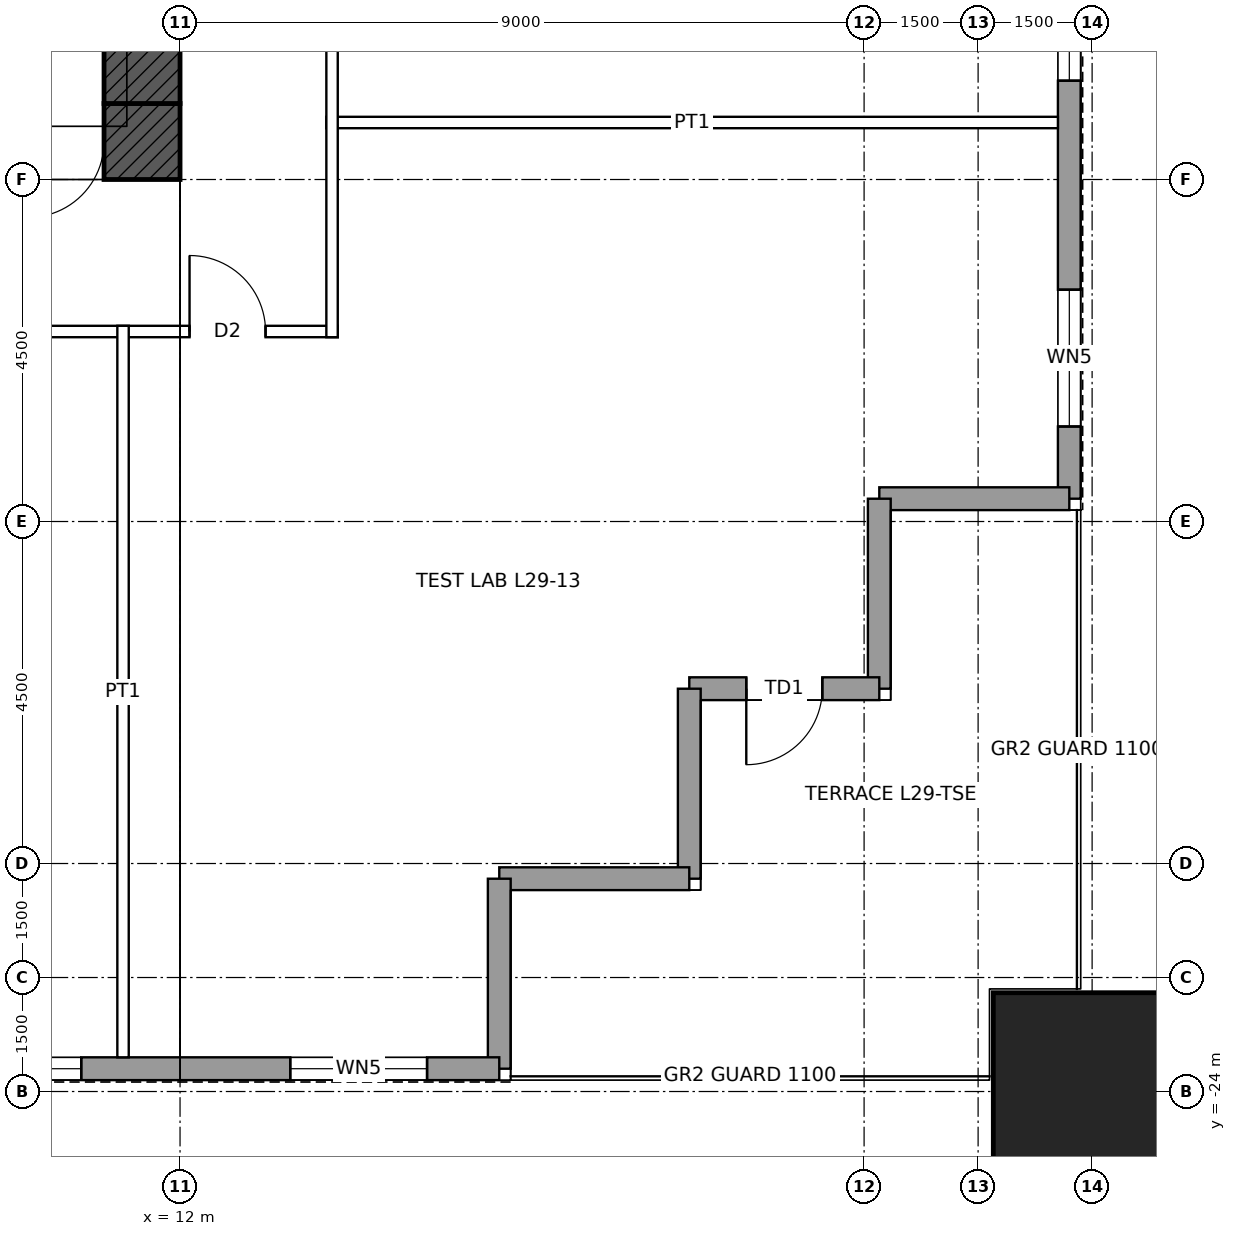
"""IFC4 building model, lengths in metres.
Left out: names, types, materials, properties, quantities, classifications, styles, units other than length and angle.
Written with IfcOpenShell. Run it as: python <this file> out.ifc"""

import sys

from ifc_helpers import new_model, si_unit, direction, frame, frame_2d, origin, origin_2d, place, context, subcontext, project, spatial, rectangle, hollow_rectangle, extrude, element, fill, save


model = new_model("IFC4")
c1 = context("Model", 3, precision=1e-05, world=origin(), true_north=direction((0.0, 1.0)))
c2 = subcontext(c1, "Body", "Model", "MODEL_VIEW")
j1 = project(units=[si_unit("LENGTHUNIT", "METRE"), si_unit("PLANEANGLEUNIT", "RADIAN")], contexts=[c1])
p1 = place(None, origin())
s1 = spatial("IfcSite", under=j1, at=p1, CompositionType="ELEMENT")
p2 = place(p1, origin())
s2 = spatial("IfcBuilding", under=s1, at=p2, CompositionType="ELEMENT")
p3 = place(p2, frame((0.0, 0.0, 144.9)))
s3 = spatial("IfcBuildingStorey", under=s2, at=p3, CompositionType="ELEMENT", Elevation=144.9)
p4 = place(p3, frame((24.0, -24.0, 0.0), z_axis=(0.0, 0.0, 1.0), x_axis=(1.0, 0.0, 0.0)))
e1 = element("IfcColumn", 1, at=p4, inside=s3, PredefinedType="COLUMN", context=c2, shape_type="SweptSolid", body=[
    extrude(hollow_rectangle(XDim=2.6, YDim=2.6, WallThickness=0.13, at=origin_2d()), origin(), (0.0, 0.0, 1.0), 4.5),
])
p5 = place(p3, frame((12.0, -11.5, 0.0), z_axis=(0.0, 0.0, 1.0), x_axis=(-1.0, 0.0, 0.0)))
e2 = element("IfcWall", 2, at=p5, inside=s3, PredefinedType="SHEAR", context=c2, shape_type="SweptSolid", body=[
    extrude(rectangle(XDim=24.0, YDim=1.0, at=frame_2d((12.0, 0.0))), origin(), (0.0, 0.0, 1.0), 4.5),
])
p6 = place(p5, frame((11.5, 0.0, 0.0)))
e3 = element("IfcOpeningElement", 3, at=p6, cuts=e2, PredefinedType="OPENING", context=c2, shape_type="SweptSolid", body=[
    extrude(rectangle(XDim=1.0, YDim=2.1, at=frame_2d((0.5, 1.05))), frame((0.0, 0.51, 0.0), z_axis=(0.0, -1.0, 0.0), x_axis=(1.0, 0.0, 0.0)), (0.0, 0.0, 1.0), 1.02),
])
p7 = place(p5, frame((1.0, 0.0, 0.0)))
e4 = element("IfcOpeningElement", 4, at=p7, cuts=e2, PredefinedType="OPENING", context=c2, shape_type="SweptSolid", body=[
    extrude(rectangle(XDim=1.0, YDim=2.4, at=frame_2d((0.5, 1.2))), frame((0.0, 0.51, 0.0), z_axis=(0.0, -1.0, 0.0), x_axis=(1.0, 0.0, 0.0)), (0.0, 0.0, 1.0), 1.02),
])
p8 = place(p3, frame((11.5, 11.0, 0.0), z_axis=(0.0, 0.0, 1.0), x_axis=(0.0, -1.0, 0.0)))
e5 = element("IfcWall", 5, at=p8, inside=s3, PredefinedType="SHEAR", context=c2, shape_type="SweptSolid", body=[
    extrude(rectangle(XDim=22.0, YDim=1.0, at=frame_2d((11.0, 0.0))), origin(), (0.0, 0.0, 1.0), 4.5),
])
p9 = place(p8, frame((10.5, 0.0, 0.0)))
e6 = element("IfcOpeningElement", 6, at=p9, cuts=e5, PredefinedType="OPENING", context=c2, shape_type="SweptSolid", body=[
    extrude(rectangle(XDim=1.0, YDim=2.4, at=frame_2d((0.5, 1.2))), frame((0.0, 0.51, 0.0), z_axis=(0.0, -1.0, 0.0), x_axis=(1.0, 0.0, 0.0)), (0.0, 0.0, 1.0), 1.02),
])
p10 = place(p3, frame((23.7, 16.2, 0.0), z_axis=(0.0, 0.0, 1.0), x_axis=(0.0, -1.0, 0.0)))
e7 = element("IfcWall", 7, at=p10, inside=s3, PredefinedType="SOLIDWALL", context=c2, shape_type="SweptSolid", body=[
    extrude(rectangle(XDim=32.4, YDim=0.3, at=frame_2d((16.2, 0.0))), origin(), (0.0, 0.0, 1.0), 4.3),
])
p11 = place(p10, frame((0.95, 0.0, 1.0)))
e8 = element("IfcOpeningElement", 8, at=p11, cuts=e7, PredefinedType="OPENING", context=c2, shape_type="SweptSolid", body=[
    extrude(rectangle(XDim=1.8, YDim=1.2, at=frame_2d((0.9, 0.6))), frame((0.0, 0.16, 0.0), z_axis=(0.0, -1.0, 0.0), x_axis=(1.0, 0.0, 0.0)), (0.0, 0.0, 1.0), 0.32),
])
p12 = place(p10, frame((5.5, 0.0, 1.0)))
e9 = element("IfcOpeningElement", 9, at=p12, cuts=e7, PredefinedType="OPENING", context=c2, shape_type="SweptSolid", body=[
    extrude(rectangle(XDim=2.4, YDim=1.2, at=frame_2d((1.2, 0.6))), frame((0.0, 0.16, 0.0), z_axis=(0.0, -1.0, 0.0), x_axis=(1.0, 0.0, 0.0)), (0.0, 0.0, 1.0), 0.32),
])
p13 = place(p10, frame((9.5, 0.0, 1.0)))
e10 = element("IfcOpeningElement", 10, at=p13, cuts=e7, PredefinedType="OPENING", context=c2, shape_type="SweptSolid", body=[
    extrude(rectangle(XDim=2.4, YDim=1.2, at=frame_2d((1.2, 0.6))), frame((0.0, 0.16, 0.0), z_axis=(0.0, -1.0, 0.0), x_axis=(1.0, 0.0, 0.0)), (0.0, 0.0, 1.0), 0.32),
])
p14 = place(p10, frame((13.0, 0.0, 1.0)))
e11 = element("IfcOpeningElement", 11, at=p14, cuts=e7, PredefinedType="OPENING", context=c2, shape_type="SweptSolid", body=[
    extrude(rectangle(XDim=2.4, YDim=1.2, at=frame_2d((1.2, 0.6))), frame((0.0, 0.16, 0.0), z_axis=(0.0, -1.0, 0.0), x_axis=(1.0, 0.0, 0.0)), (0.0, 0.0, 1.0), 0.32),
])
p15 = place(p10, frame((17.0, 0.0, 1.0)))
e12 = element("IfcOpeningElement", 12, at=p15, cuts=e7, PredefinedType="OPENING", context=c2, shape_type="SweptSolid", body=[
    extrude(rectangle(XDim=2.4, YDim=1.2, at=frame_2d((1.2, 0.6))), frame((0.0, 0.16, 0.0), z_axis=(0.0, -1.0, 0.0), x_axis=(1.0, 0.0, 0.0)), (0.0, 0.0, 1.0), 0.32),
])
p16 = place(p10, frame((20.5, 0.0, 1.0)))
e13 = element("IfcOpeningElement", 13, at=p16, cuts=e7, PredefinedType="OPENING", context=c2, shape_type="SweptSolid", body=[
    extrude(rectangle(XDim=2.4, YDim=1.2, at=frame_2d((1.2, 0.6))), frame((0.0, 0.16, 0.0), z_axis=(0.0, -1.0, 0.0), x_axis=(1.0, 0.0, 0.0)), (0.0, 0.0, 1.0), 0.32),
])
p17 = place(p10, frame((24.5, 0.0, 1.0)))
e14 = element("IfcOpeningElement", 14, at=p17, cuts=e7, PredefinedType="OPENING", context=c2, shape_type="SweptSolid", body=[
    extrude(rectangle(XDim=2.4, YDim=1.2, at=frame_2d((1.2, 0.6))), frame((0.0, 0.16, 0.0), z_axis=(0.0, -1.0, 0.0), x_axis=(1.0, 0.0, 0.0)), (0.0, 0.0, 1.0), 0.32),
])
p18 = place(p10, frame((29.65, 0.0, 1.0)))
e15 = element("IfcOpeningElement", 15, at=p18, cuts=e7, PredefinedType="OPENING", context=c2, shape_type="SweptSolid", body=[
    extrude(rectangle(XDim=1.8, YDim=1.2, at=frame_2d((0.9, 0.6))), frame((0.0, 0.16, 0.0), z_axis=(0.0, -1.0, 0.0), x_axis=(1.0, 0.0, 0.0)), (0.0, 0.0, 1.0), 0.32),
])
for number, where, z_axis, x_axis in (
    (16, (23.7, -16.2, 0.0), (0.0, 0.0, 1.0), (-1.0, 0.0, 0.0)),
    (17, (21.2, -16.2, 0.0), (0.0, 0.0, 1.0), (0.0, -1.0, 0.0)),
):
    element("IfcWall", number, at=place(p3, frame(where, z_axis=z_axis, x_axis=x_axis)), inside=s3, PredefinedType="SOLIDWALL", context=c2, shape_type="SweptSolid", body=[
        extrude(rectangle(XDim=2.5, YDim=0.3, at=frame_2d((1.25, 0.0))), origin(), (0.0, 0.0, 1.0), 4.3),
    ])
p19 = place(p3, frame((21.2, -18.7, 0.0), z_axis=(0.0, 0.0, 1.0), x_axis=(-1.0, 0.0, 0.0)))
e18 = element("IfcWall", 18, at=p19, inside=s3, PredefinedType="SOLIDWALL", context=c2, shape_type="SweptSolid", body=[
    extrude(rectangle(XDim=2.5, YDim=0.3, at=frame_2d((1.25, 0.0))), origin(), (0.0, 0.0, 1.0), 4.3),
])
p20 = place(p19, frame((0.75, 0.0, 0.0)))
e19 = element("IfcOpeningElement", 19, at=p20, cuts=e18, PredefinedType="OPENING", context=c2, shape_type="SweptSolid", body=[
    extrude(rectangle(XDim=1.0, YDim=2.4, at=frame_2d((0.5, 1.2))), frame((0.0, 0.16, 0.0), z_axis=(0.0, -1.0, 0.0), x_axis=(1.0, 0.0, 0.0)), (0.0, 0.0, 1.0), 0.32),
])
for number, where, z_axis, x_axis in (
    (20, (18.7, -18.7, 0.0), (0.0, 0.0, 1.0), (0.0, -1.0, 0.0)),
    (21, (18.7, -21.2, 0.0), (0.0, 0.0, 1.0), (-1.0, 0.0, 0.0)),
    (22, (16.2, -21.2, 0.0), (0.0, 0.0, 1.0), (0.0, -1.0, 0.0)),
):
    element("IfcWall", number, at=place(p3, frame(where, z_axis=z_axis, x_axis=x_axis)), inside=s3, PredefinedType="SOLIDWALL", context=c2, shape_type="SweptSolid", body=[
        extrude(rectangle(XDim=2.5, YDim=0.3, at=frame_2d((1.25, 0.0))), origin(), (0.0, 0.0, 1.0), 4.3),
    ])
p21 = place(p3, frame((16.2, -23.7, 0.0), z_axis=(0.0, 0.0, 1.0), x_axis=(-1.0, 0.0, 0.0)))
e23 = element("IfcWall", 23, at=p21, inside=s3, PredefinedType="SOLIDWALL", context=c2, shape_type="SweptSolid", body=[
    extrude(rectangle(XDim=32.4, YDim=0.3, at=frame_2d((16.2, 0.0))), origin(), (0.0, 0.0, 1.0), 4.3),
])
p22 = place(p21, frame((0.95, 0.0, 1.0)))
e24 = element("IfcOpeningElement", 24, at=p22, cuts=e23, PredefinedType="OPENING", context=c2, shape_type="SweptSolid", body=[
    extrude(rectangle(XDim=1.8, YDim=1.2, at=frame_2d((0.9, 0.6))), frame((0.0, 0.16, 0.0), z_axis=(0.0, -1.0, 0.0), x_axis=(1.0, 0.0, 0.0)), (0.0, 0.0, 1.0), 0.32),
])
p23 = place(p21, frame((5.5, 0.0, 1.0)))
e25 = element("IfcOpeningElement", 25, at=p23, cuts=e23, PredefinedType="OPENING", context=c2, shape_type="SweptSolid", body=[
    extrude(rectangle(XDim=2.4, YDim=1.2, at=frame_2d((1.2, 0.6))), frame((0.0, 0.16, 0.0), z_axis=(0.0, -1.0, 0.0), x_axis=(1.0, 0.0, 0.0)), (0.0, 0.0, 1.0), 0.32),
])
p24 = place(p21, frame((9.5, 0.0, 1.0)))
e26 = element("IfcOpeningElement", 26, at=p24, cuts=e23, PredefinedType="OPENING", context=c2, shape_type="SweptSolid", body=[
    extrude(rectangle(XDim=2.4, YDim=1.2, at=frame_2d((1.2, 0.6))), frame((0.0, 0.16, 0.0), z_axis=(0.0, -1.0, 0.0), x_axis=(1.0, 0.0, 0.0)), (0.0, 0.0, 1.0), 0.32),
])
p25 = place(p21, frame((13.0, 0.0, 1.0)))
e27 = element("IfcOpeningElement", 27, at=p25, cuts=e23, PredefinedType="OPENING", context=c2, shape_type="SweptSolid", body=[
    extrude(rectangle(XDim=2.4, YDim=1.2, at=frame_2d((1.2, 0.6))), frame((0.0, 0.16, 0.0), z_axis=(0.0, -1.0, 0.0), x_axis=(1.0, 0.0, 0.0)), (0.0, 0.0, 1.0), 0.32),
])
p26 = place(p21, frame((17.0, 0.0, 1.0)))
e28 = element("IfcOpeningElement", 28, at=p26, cuts=e23, PredefinedType="OPENING", context=c2, shape_type="SweptSolid", body=[
    extrude(rectangle(XDim=2.4, YDim=1.2, at=frame_2d((1.2, 0.6))), frame((0.0, 0.16, 0.0), z_axis=(0.0, -1.0, 0.0), x_axis=(1.0, 0.0, 0.0)), (0.0, 0.0, 1.0), 0.32),
])
p27 = place(p21, frame((20.5, 0.0, 1.0)))
e29 = element("IfcOpeningElement", 29, at=p27, cuts=e23, PredefinedType="OPENING", context=c2, shape_type="SweptSolid", body=[
    extrude(rectangle(XDim=2.4, YDim=1.2, at=frame_2d((1.2, 0.6))), frame((0.0, 0.16, 0.0), z_axis=(0.0, -1.0, 0.0), x_axis=(1.0, 0.0, 0.0)), (0.0, 0.0, 1.0), 0.32),
])
p28 = place(p21, frame((24.5, 0.0, 1.0)))
e30 = element("IfcOpeningElement", 30, at=p28, cuts=e23, PredefinedType="OPENING", context=c2, shape_type="SweptSolid", body=[
    extrude(rectangle(XDim=2.4, YDim=1.2, at=frame_2d((1.2, 0.6))), frame((0.0, 0.16, 0.0), z_axis=(0.0, -1.0, 0.0), x_axis=(1.0, 0.0, 0.0)), (0.0, 0.0, 1.0), 0.32),
])
p29 = place(p21, frame((29.65, 0.0, 1.0)))
e31 = element("IfcOpeningElement", 31, at=p29, cuts=e23, PredefinedType="OPENING", context=c2, shape_type="SweptSolid", body=[
    extrude(rectangle(XDim=1.8, YDim=1.2, at=frame_2d((0.9, 0.6))), frame((0.0, 0.16, 0.0), z_axis=(0.0, -1.0, 0.0), x_axis=(1.0, 0.0, 0.0)), (0.0, 0.0, 1.0), 0.32),
])
p30 = place(p3, frame((-14.075, -14.0, 0.0), z_axis=(0.0, 0.0, 1.0), x_axis=(1.0, 0.0, 0.0)))
e32 = element("IfcWall", 32, at=p30, inside=s3, PredefinedType="PARTITIONING", context=c2, shape_type="SweptSolid", body=[
    extrude(rectangle(XDim=28.15, YDim=0.15, at=frame_2d((14.075, 0.0))), origin(), (0.0, 0.0, 1.0), 4.3),
])
p31 = place(p30, frame((18.8, 0.0, 0.0)))
e33 = element("IfcOpeningElement", 33, at=p31, cuts=e32, PredefinedType="OPENING", context=c2, shape_type="SweptSolid", body=[
    extrude(rectangle(XDim=1.8, YDim=2.4, at=frame_2d((0.9, 1.2))), frame((0.0, 0.085, 0.0), z_axis=(0.0, -1.0, 0.0), x_axis=(1.0, 0.0, 0.0)), (0.0, 0.0, 1.0), 0.17),
])
p32 = place(p30, frame((9.425, 0.0, 0.0)))
e34 = element("IfcOpeningElement", 34, at=p32, cuts=e32, PredefinedType="OPENING", context=c2, shape_type="SweptSolid", body=[
    extrude(rectangle(XDim=1.8, YDim=2.4, at=frame_2d((0.9, 1.2))), frame((0.0, 0.085, 0.0), z_axis=(0.0, -1.0, 0.0), x_axis=(1.0, 0.0, 0.0)), (0.0, 0.0, 1.0), 0.17),
])
p33 = place(p30, frame((4.2, 0.0, 0.0)))
e35 = element("IfcOpeningElement", 35, at=p33, cuts=e32, PredefinedType="OPENING", context=c2, shape_type="SweptSolid", body=[
    extrude(rectangle(XDim=1.0, YDim=2.1, at=frame_2d((0.5, 1.05))), frame((0.0, 0.085, 0.0), z_axis=(0.0, -1.0, 0.0), x_axis=(1.0, 0.0, 0.0)), (0.0, 0.0, 1.0), 0.17),
])
p34 = place(p30, frame((26.2, 0.0, 0.0)))
e36 = element("IfcOpeningElement", 36, at=p34, cuts=e32, PredefinedType="OPENING", context=c2, shape_type="SweptSolid", body=[
    extrude(rectangle(XDim=1.0, YDim=2.1, at=frame_2d((0.5, 1.05))), frame((0.0, 0.085, 0.0), z_axis=(0.0, -1.0, 0.0), x_axis=(1.0, 0.0, 0.0)), (0.0, 0.0, 1.0), 0.17),
])
p35 = place(p30, frame((0.95, 0.0, 0.0)))
e37 = element("IfcOpeningElement", 37, at=p35, cuts=e32, PredefinedType="OPENING", context=c2, shape_type="SweptSolid", body=[
    extrude(rectangle(XDim=1.0, YDim=2.1, at=frame_2d((0.5, 1.05))), frame((0.0, 0.085, 0.0), z_axis=(0.0, -1.0, 0.0), x_axis=(1.0, 0.0, 0.0)), (0.0, 0.0, 1.0), 0.17),
])
for number, where, z_axis, x_axis in (
    (38, (13.925, -11.25, 0.0), (0.0, 0.0, 1.0), (1.0, 0.0, 0.0)),
    (39, (11.25, -23.55, 0.0), (0.0, 0.0, 1.0), (0.0, 1.0, 0.0)),
):
    element("IfcWall", number, at=place(p3, frame(where, z_axis=z_axis, x_axis=x_axis)), inside=s3, PredefinedType="PARTITIONING", context=c2, shape_type="SweptSolid", body=[
        extrude(rectangle(XDim=9.625, YDim=0.15, at=frame_2d((4.812, 0.0))), origin(), (0.0, 0.0, 1.0), 3.431),
    ])
p36 = place(p3, frame((14.0, -14.075, 0.0), z_axis=(0.0, 0.0, 1.0), x_axis=(0.0, 1.0, 0.0)))
e40 = element("IfcWall", 40, at=p36, inside=s3, PredefinedType="PARTITIONING", context=c2, shape_type="SweptSolid", body=[
    extrude(rectangle(XDim=26.15, YDim=0.15, at=frame_2d((13.075, 0.0))), origin(), (0.0, 0.0, 1.0), 4.3),
])
p37 = place(p36, frame((18.8, 0.0, 0.0)))
e41 = element("IfcOpeningElement", 41, at=p37, cuts=e40, PredefinedType="OPENING", context=c2, shape_type="SweptSolid", body=[
    extrude(rectangle(XDim=1.8, YDim=2.4, at=frame_2d((0.9, 1.2))), frame((0.0, 0.085, 0.0), z_axis=(0.0, -1.0, 0.0), x_axis=(1.0, 0.0, 0.0)), (0.0, 0.0, 1.0), 0.17),
])
p38 = place(p36, frame((7.55, 0.0, 0.0)))
e42 = element("IfcOpeningElement", 42, at=p38, cuts=e40, PredefinedType="OPENING", context=c2, shape_type="SweptSolid", body=[
    extrude(rectangle(XDim=1.8, YDim=2.4, at=frame_2d((0.9, 1.2))), frame((0.0, 0.085, 0.0), z_axis=(0.0, -1.0, 0.0), x_axis=(1.0, 0.0, 0.0)), (0.0, 0.0, 1.0), 0.17),
])
p39 = place(p17, origin())
e43 = element("IfcWindow", 43, at=p39, inside=s3, PartitioningType="SINGLE_PANEL", PredefinedType="WINDOW", context=c2, shape_type="SweptSolid", body=[
    extrude(rectangle(XDim=2.4, YDim=1.2, at=frame_2d((1.2, 0.6))), frame((0.0, 0.03, 0.0), z_axis=(0.0, -1.0, 0.0), x_axis=(1.0, 0.0, 0.0)), (0.0, 0.0, 1.0), 0.06),
])
fill(e14, e43)
p40 = place(p18, origin())
e44 = element("IfcWindow", 44, at=p40, inside=s3, PartitioningType="SINGLE_PANEL", PredefinedType="WINDOW", context=c2, shape_type="SweptSolid", body=[
    extrude(rectangle(XDim=1.8, YDim=1.2, at=frame_2d((0.9, 0.6))), frame((0.0, 0.03, 0.0), z_axis=(0.0, -1.0, 0.0), x_axis=(1.0, 0.0, 0.0)), (0.0, 0.0, 1.0), 0.06),
])
fill(e15, e44)
p41 = place(p20, origin())
e45 = element("IfcDoor", 45, at=p41, inside=s3, OperationType="SINGLE_SWING_RIGHT", PredefinedType="DOOR", context=c2, shape_type="SweptSolid", body=[
    extrude(rectangle(XDim=1.0, YDim=2.4, at=frame_2d((0.5, 1.2))), frame((0.0, 0.025, 0.0), z_axis=(0.0, -1.0, 0.0), x_axis=(1.0, 0.0, 0.0)), (0.0, 0.0, 1.0), 0.05),
])
fill(e19, e45)
p42 = place(p22, origin())
e46 = element("IfcWindow", 46, at=p42, inside=s3, PartitioningType="SINGLE_PANEL", PredefinedType="WINDOW", context=c2, shape_type="SweptSolid", body=[
    extrude(rectangle(XDim=1.8, YDim=1.2, at=frame_2d((0.9, 0.6))), frame((0.0, 0.03, 0.0), z_axis=(0.0, -1.0, 0.0), x_axis=(1.0, 0.0, 0.0)), (0.0, 0.0, 1.0), 0.06),
])
fill(e24, e46)
p43 = place(p23, origin())
e47 = element("IfcWindow", 47, at=p43, inside=s3, PartitioningType="SINGLE_PANEL", PredefinedType="WINDOW", context=c2, shape_type="SweptSolid", body=[
    extrude(rectangle(XDim=2.4, YDim=1.2, at=frame_2d((1.2, 0.6))), frame((0.0, 0.03, 0.0), z_axis=(0.0, -1.0, 0.0), x_axis=(1.0, 0.0, 0.0)), (0.0, 0.0, 1.0), 0.06),
])
fill(e25, e47)
p44 = place(p7, origin())
e48 = element("IfcDoor", 48, at=p44, inside=s3, OperationType="SINGLE_SWING_RIGHT", PredefinedType="DOOR", context=c2, shape_type="SweptSolid", body=[
    extrude(rectangle(XDim=1.0, YDim=2.4, at=frame_2d((0.5, 1.2))), frame((0.0, 0.485, 0.0), z_axis=(0.0, -1.0, 0.0), x_axis=(1.0, 0.0, 0.0)), (0.0, 0.0, 1.0), 0.05),
])
fill(e4, e48)
p45 = place(p34, origin())
e49 = element("IfcDoor", 49, at=p45, inside=s3, OperationType="SINGLE_SWING_LEFT", PredefinedType="DOOR", context=c2, shape_type="SweptSolid", body=[
    extrude(rectangle(XDim=1.0, YDim=2.1, at=frame_2d((0.5, 1.05))), frame((0.0, 0.025, 0.0), z_axis=(0.0, -1.0, 0.0), x_axis=(1.0, 0.0, 0.0)), (0.0, 0.0, 1.0), 0.05),
])
fill(e36, e49)
save(model, sys.argv[1])
